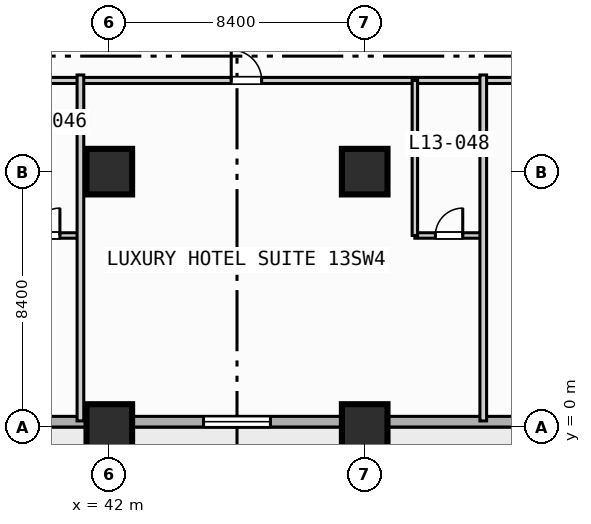
"""IFC4 building model, lengths in metres.
Left out: names, types, materials, properties, quantities, classifications, styles, units other than length and angle.
Written with IfcOpenShell. Run it as: python <this file> out.ifc"""

import sys

from ifc_helpers import new_model, si_unit, direction, frame, frame_2d, origin, origin_2d, place, context, subcontext, project, spatial, rectangle, extrude, element, fill, save


model = new_model("IFC4")
c1 = context("Model", 3, precision=1e-05, world=origin(), true_north=direction((0.0, 1.0)))
c2 = subcontext(c1, "Body", "Model", "MODEL_VIEW")
j1 = project(units=[si_unit("LENGTHUNIT", "METRE"), si_unit("PLANEANGLEUNIT", "RADIAN")], contexts=[c1])
p1 = place(None, origin())
s1 = spatial("IfcSite", under=j1, at=p1, CompositionType="ELEMENT")
p2 = place(p1, origin())
s2 = spatial("IfcBuilding", under=s1, at=p2, CompositionType="ELEMENT")
p3 = place(p2, frame((0.0, 0.0, 58.6)))
s3 = spatial("IfcBuildingStorey", under=s2, at=p3, CompositionType="ELEMENT", Elevation=58.6)
for number, where, z_axis, x_axis in (
    (1, (42.0, 0.0, 0.0), (0.0, 0.0, 1.0), (1.0, 0.0, 0.0)),
    (2, (42.0, 8.4, 0.0), (0.0, 0.0, 1.0), (1.0, 0.0, 0.0)),
    (3, (50.4, 0.0, 0.0), (0.0, 0.0, 1.0), (1.0, 0.0, 0.0)),
    (4, (50.4, 8.4, 0.0), (0.0, 0.0, 1.0), (1.0, 0.0, 0.0)),
):
    element("IfcColumn", number, at=place(p3, frame(where, z_axis=z_axis, x_axis=x_axis)), inside=s3, PredefinedType="COLUMN", context=c2, shape_type="SweptSolid", body=[
        extrude(rectangle(XDim=1.5, YDim=1.5, at=origin_2d()), origin(), (0.0, 0.0, 1.0), 3.8),
    ])
p4 = place(p3, frame((89.225, 0.175, 0.0), z_axis=(0.0, 0.0, 1.0), x_axis=(-1.0, 0.0, 0.0)))
e5 = element("IfcWall", 5, at=p4, inside=s3, PredefinedType="STANDARD", context=c2, shape_type="SweptSolid", body=[
    extrude(rectangle(XDim=86.05, YDim=0.35, at=frame_2d((43.025, 0.0))), origin(), (0.0, 0.0, 1.0), 3.55),
])
p5 = place(p4, frame((69.025, 0.0, 0.0)))
e6 = element("IfcOpeningElement", 6, at=p5, cuts=e5, PredefinedType="OPENING", context=c2, shape_type="SweptSolid", body=[
    extrude(rectangle(XDim=1.4, YDim=2.2, at=frame_2d((0.7, 1.1))), frame((0.0, 0.185, 0.0), z_axis=(0.0, -1.0, 0.0), x_axis=(1.0, 0.0, 0.0)), (0.0, 0.0, 1.0), 0.37),
])
p6 = place(p4, frame((58.725, 0.0, 0.85)))
e7 = element("IfcOpeningElement", 7, at=p6, cuts=e5, PredefinedType="OPENING", context=c2, shape_type="SweptSolid", body=[
    extrude(rectangle(XDim=2.2, YDim=1.8, at=frame_2d((1.1, 0.9))), frame((0.0, 0.185, 0.0), z_axis=(0.0, -1.0, 0.0), x_axis=(1.0, 0.0, 0.0)), (0.0, 0.0, 1.0), 0.37),
])
p7 = place(p4, frame((50.325, 0.0, 0.85)))
e8 = element("IfcOpeningElement", 8, at=p7, cuts=e5, PredefinedType="OPENING", context=c2, shape_type="SweptSolid", body=[
    extrude(rectangle(XDim=2.2, YDim=1.8, at=frame_2d((1.1, 0.9))), frame((0.0, 0.185, 0.0), z_axis=(0.0, -1.0, 0.0), x_axis=(1.0, 0.0, 0.0)), (0.0, 0.0, 1.0), 0.37),
])
p8 = place(p4, frame((41.925, 0.0, 0.85)))
e9 = element("IfcOpeningElement", 9, at=p8, cuts=e5, PredefinedType="OPENING", context=c2, shape_type="SweptSolid", body=[
    extrude(rectangle(XDim=2.2, YDim=1.8, at=frame_2d((1.1, 0.9))), frame((0.0, 0.185, 0.0), z_axis=(0.0, -1.0, 0.0), x_axis=(1.0, 0.0, 0.0)), (0.0, 0.0, 1.0), 0.37),
])
p9 = place(p4, frame((27.775, 0.0, 0.85)))
e10 = element("IfcOpeningElement", 10, at=p9, cuts=e5, PredefinedType="OPENING", context=c2, shape_type="SweptSolid", body=[
    extrude(rectangle(XDim=1.8, YDim=1.8, at=frame_2d((0.9, 0.9))), frame((0.0, 0.185, 0.0), z_axis=(0.0, -1.0, 0.0), x_axis=(1.0, 0.0, 0.0)), (0.0, 0.0, 1.0), 0.37),
])
p10 = place(p3, frame((13.5, 11.4, 0.0), z_axis=(0.0, 0.0, 1.0), x_axis=(1.0, 0.0, 0.0)))
e11 = element("IfcWall", 11, at=p10, inside=s3, PredefinedType="PARTITIONING", context=c2, shape_type="SweptSolid", body=[
    extrude(rectangle(XDim=50.3, YDim=0.2, at=frame_2d((25.15, 0.0))), origin(), (0.0, 0.0, 1.0), 3.55),
])
p11 = place(p10, frame((2.135, 0.0, 0.0)))
e12 = element("IfcOpeningElement", 12, at=p11, cuts=e11, PredefinedType="OPENING", context=c2, shape_type="SweptSolid", body=[
    extrude(rectangle(XDim=1.0, YDim=2.15, at=frame_2d((0.5, 1.075))), frame((0.0, 0.11, 0.0), z_axis=(0.0, -1.0, 0.0), x_axis=(1.0, 0.0, 0.0)), (0.0, 0.0, 1.0), 0.22),
])
p12 = place(p10, frame((14.665, 0.0, 0.0)))
e13 = element("IfcOpeningElement", 13, at=p12, cuts=e11, PredefinedType="OPENING", context=c2, shape_type="SweptSolid", body=[
    extrude(rectangle(XDim=1.0, YDim=2.15, at=frame_2d((0.5, 1.075))), frame((0.0, 0.11, 0.0), z_axis=(0.0, -1.0, 0.0), x_axis=(1.0, 0.0, 0.0)), (0.0, 0.0, 1.0), 0.22),
])
p13 = place(p10, frame((22.31, 0.0, 0.0)))
e14 = element("IfcOpeningElement", 14, at=p13, cuts=e11, PredefinedType="OPENING", context=c2, shape_type="SweptSolid", body=[
    extrude(rectangle(XDim=1.0, YDim=2.15, at=frame_2d((0.5, 1.075))), frame((0.0, 0.11, 0.0), z_axis=(0.0, -1.0, 0.0), x_axis=(1.0, 0.0, 0.0)), (0.0, 0.0, 1.0), 0.22),
])
p14 = place(p10, frame((32.51, 0.0, 0.0)))
e15 = element("IfcOpeningElement", 15, at=p14, cuts=e11, PredefinedType="OPENING", context=c2, shape_type="SweptSolid", body=[
    extrude(rectangle(XDim=1.0, YDim=2.15, at=frame_2d((0.5, 1.075))), frame((0.0, 0.11, 0.0), z_axis=(0.0, -1.0, 0.0), x_axis=(1.0, 0.0, 0.0)), (0.0, 0.0, 1.0), 0.22),
])
p15 = place(p10, frame((43.885, 0.0, 0.0)))
e16 = element("IfcOpeningElement", 16, at=p15, cuts=e11, PredefinedType="OPENING", context=c2, shape_type="SweptSolid", body=[
    extrude(rectangle(XDim=1.0, YDim=2.15, at=frame_2d((0.5, 1.075))), frame((0.0, 0.11, 0.0), z_axis=(0.0, -1.0, 0.0), x_axis=(1.0, 0.0, 0.0)), (0.0, 0.0, 1.0), 0.22),
])
p16 = place(p3, frame((38.8, 6.3, 0.0), z_axis=(0.0, 0.0, 1.0), x_axis=(1.0, 0.0, 0.0)))
e17 = element("IfcWall", 17, at=p16, inside=s3, PredefinedType="PLUMBINGWALL", context=c2, shape_type="SweptSolid", body=[
    extrude(rectangle(XDim=2.25, YDim=0.18, at=frame_2d((1.125, 0.0))), origin(), (0.0, 0.0, 1.0), 3.55),
])
p17 = place(p16, frame((0.675, 0.0, 0.0)))
e18 = element("IfcOpeningElement", 18, at=p17, cuts=e17, PredefinedType="OPENING", context=c2, shape_type="SweptSolid", body=[
    extrude(rectangle(XDim=0.9, YDim=2.1, at=frame_2d((0.45, 1.05))), frame((0.0, 0.1, 0.0), z_axis=(0.0, -1.0, 0.0), x_axis=(1.0, 0.0, 0.0)), (0.0, 0.0, 1.0), 0.2),
])
p18 = place(p3, frame((41.05, 0.2, 0.0), z_axis=(0.0, 0.0, 1.0), x_axis=(0.0, 1.0, 0.0)))
e19 = element("IfcWall", 19, at=p18, inside=s3, PredefinedType="PARTITIONING", context=c2, shape_type="SweptSolid", body=[
    extrude(rectangle(XDim=11.38, YDim=0.22, at=frame_2d((5.69, 0.0))), origin(), (0.0, 0.0, 1.0), 3.55),
])
p19 = place(p3, frame((52.05, 6.3, 0.0), z_axis=(0.0, 0.0, 1.0), x_axis=(1.0, 0.0, 0.0)))
e20 = element("IfcWall", 20, at=p19, inside=s3, PredefinedType="PLUMBINGWALL", context=c2, shape_type="SweptSolid", body=[
    extrude(rectangle(XDim=2.25, YDim=0.18, at=frame_2d((1.125, 0.0))), origin(), (0.0, 0.0, 1.0), 3.55),
])
p20 = place(p19, frame((0.675, 0.0, 0.0)))
e21 = element("IfcOpeningElement", 21, at=p20, cuts=e20, PredefinedType="OPENING", context=c2, shape_type="SweptSolid", body=[
    extrude(rectangle(XDim=0.9, YDim=2.1, at=frame_2d((0.45, 1.05))), frame((0.0, 0.1, 0.0), z_axis=(0.0, -1.0, 0.0), x_axis=(1.0, 0.0, 0.0)), (0.0, 0.0, 1.0), 0.2),
])
p21 = place(p3, frame((52.05, 6.3, 0.0), z_axis=(0.0, 0.0, 1.0), x_axis=(0.0, 1.0, 0.0)))
e22 = element("IfcWall", 22, at=p21, inside=s3, PredefinedType="PLUMBINGWALL", context=c2, shape_type="SweptSolid", body=[
    extrude(rectangle(XDim=5.1, YDim=0.18, at=frame_2d((2.55, 0.0))), origin(), (0.0, 0.0, 1.0), 3.55),
])
p22 = place(p3, frame((54.3, 0.2, 0.0), z_axis=(0.0, 0.0, 1.0), x_axis=(0.0, 1.0, 0.0)))
e23 = element("IfcWall", 23, at=p22, inside=s3, PredefinedType="PARTITIONING", context=c2, shape_type="SweptSolid", body=[
    extrude(rectangle(XDim=11.38, YDim=0.22, at=frame_2d((5.69, 0.0))), origin(), (0.0, 0.0, 1.0), 3.55),
])
p23 = place(p8, origin())
e24 = element("IfcWindow", 24, at=p23, inside=s3, PartitioningType="SINGLE_PANEL", PredefinedType="WINDOW", context=c2, shape_type="SweptSolid", body=[
    extrude(rectangle(XDim=2.2, YDim=1.8, at=frame_2d((1.1, 0.9))), frame((0.0, 0.03, 0.0), z_axis=(0.0, -1.0, 0.0), x_axis=(1.0, 0.0, 0.0)), (0.0, 0.0, 1.0), 0.06),
])
fill(e9, e24)
p24 = place(p14, origin())
e25 = element("IfcDoor", 25, at=p24, inside=s3, OperationType="SINGLE_SWING_LEFT", PredefinedType="DOOR", context=c2, shape_type="SweptSolid", body=[
    extrude(rectangle(XDim=1.0, YDim=2.15, at=frame_2d((0.5, 1.075))), frame((0.0, 0.025, 0.0), z_axis=(0.0, -1.0, 0.0), x_axis=(1.0, 0.0, 0.0)), (0.0, 0.0, 1.0), 0.05),
])
fill(e15, e25)
p25 = place(p17, origin())
e26 = element("IfcDoor", 26, at=p25, inside=s3, OperationType="SINGLE_SWING_RIGHT", PredefinedType="DOOR", context=c2, shape_type="SweptSolid", body=[
    extrude(rectangle(XDim=0.9, YDim=2.1, at=frame_2d((0.45, 1.05))), frame((0.0, 0.025, 0.0), z_axis=(0.0, -1.0, 0.0), x_axis=(1.0, 0.0, 0.0)), (0.0, 0.0, 1.0), 0.05),
])
fill(e18, e26)
p26 = place(p20, origin())
e27 = element("IfcDoor", 27, at=p26, inside=s3, OperationType="SINGLE_SWING_RIGHT", PredefinedType="DOOR", context=c2, shape_type="SweptSolid", body=[
    extrude(rectangle(XDim=0.9, YDim=2.1, at=frame_2d((0.45, 1.05))), frame((0.0, 0.025, 0.0), z_axis=(0.0, -1.0, 0.0), x_axis=(1.0, 0.0, 0.0)), (0.0, 0.0, 1.0), 0.05),
])
fill(e21, e27)
save(model, sys.argv[1])
